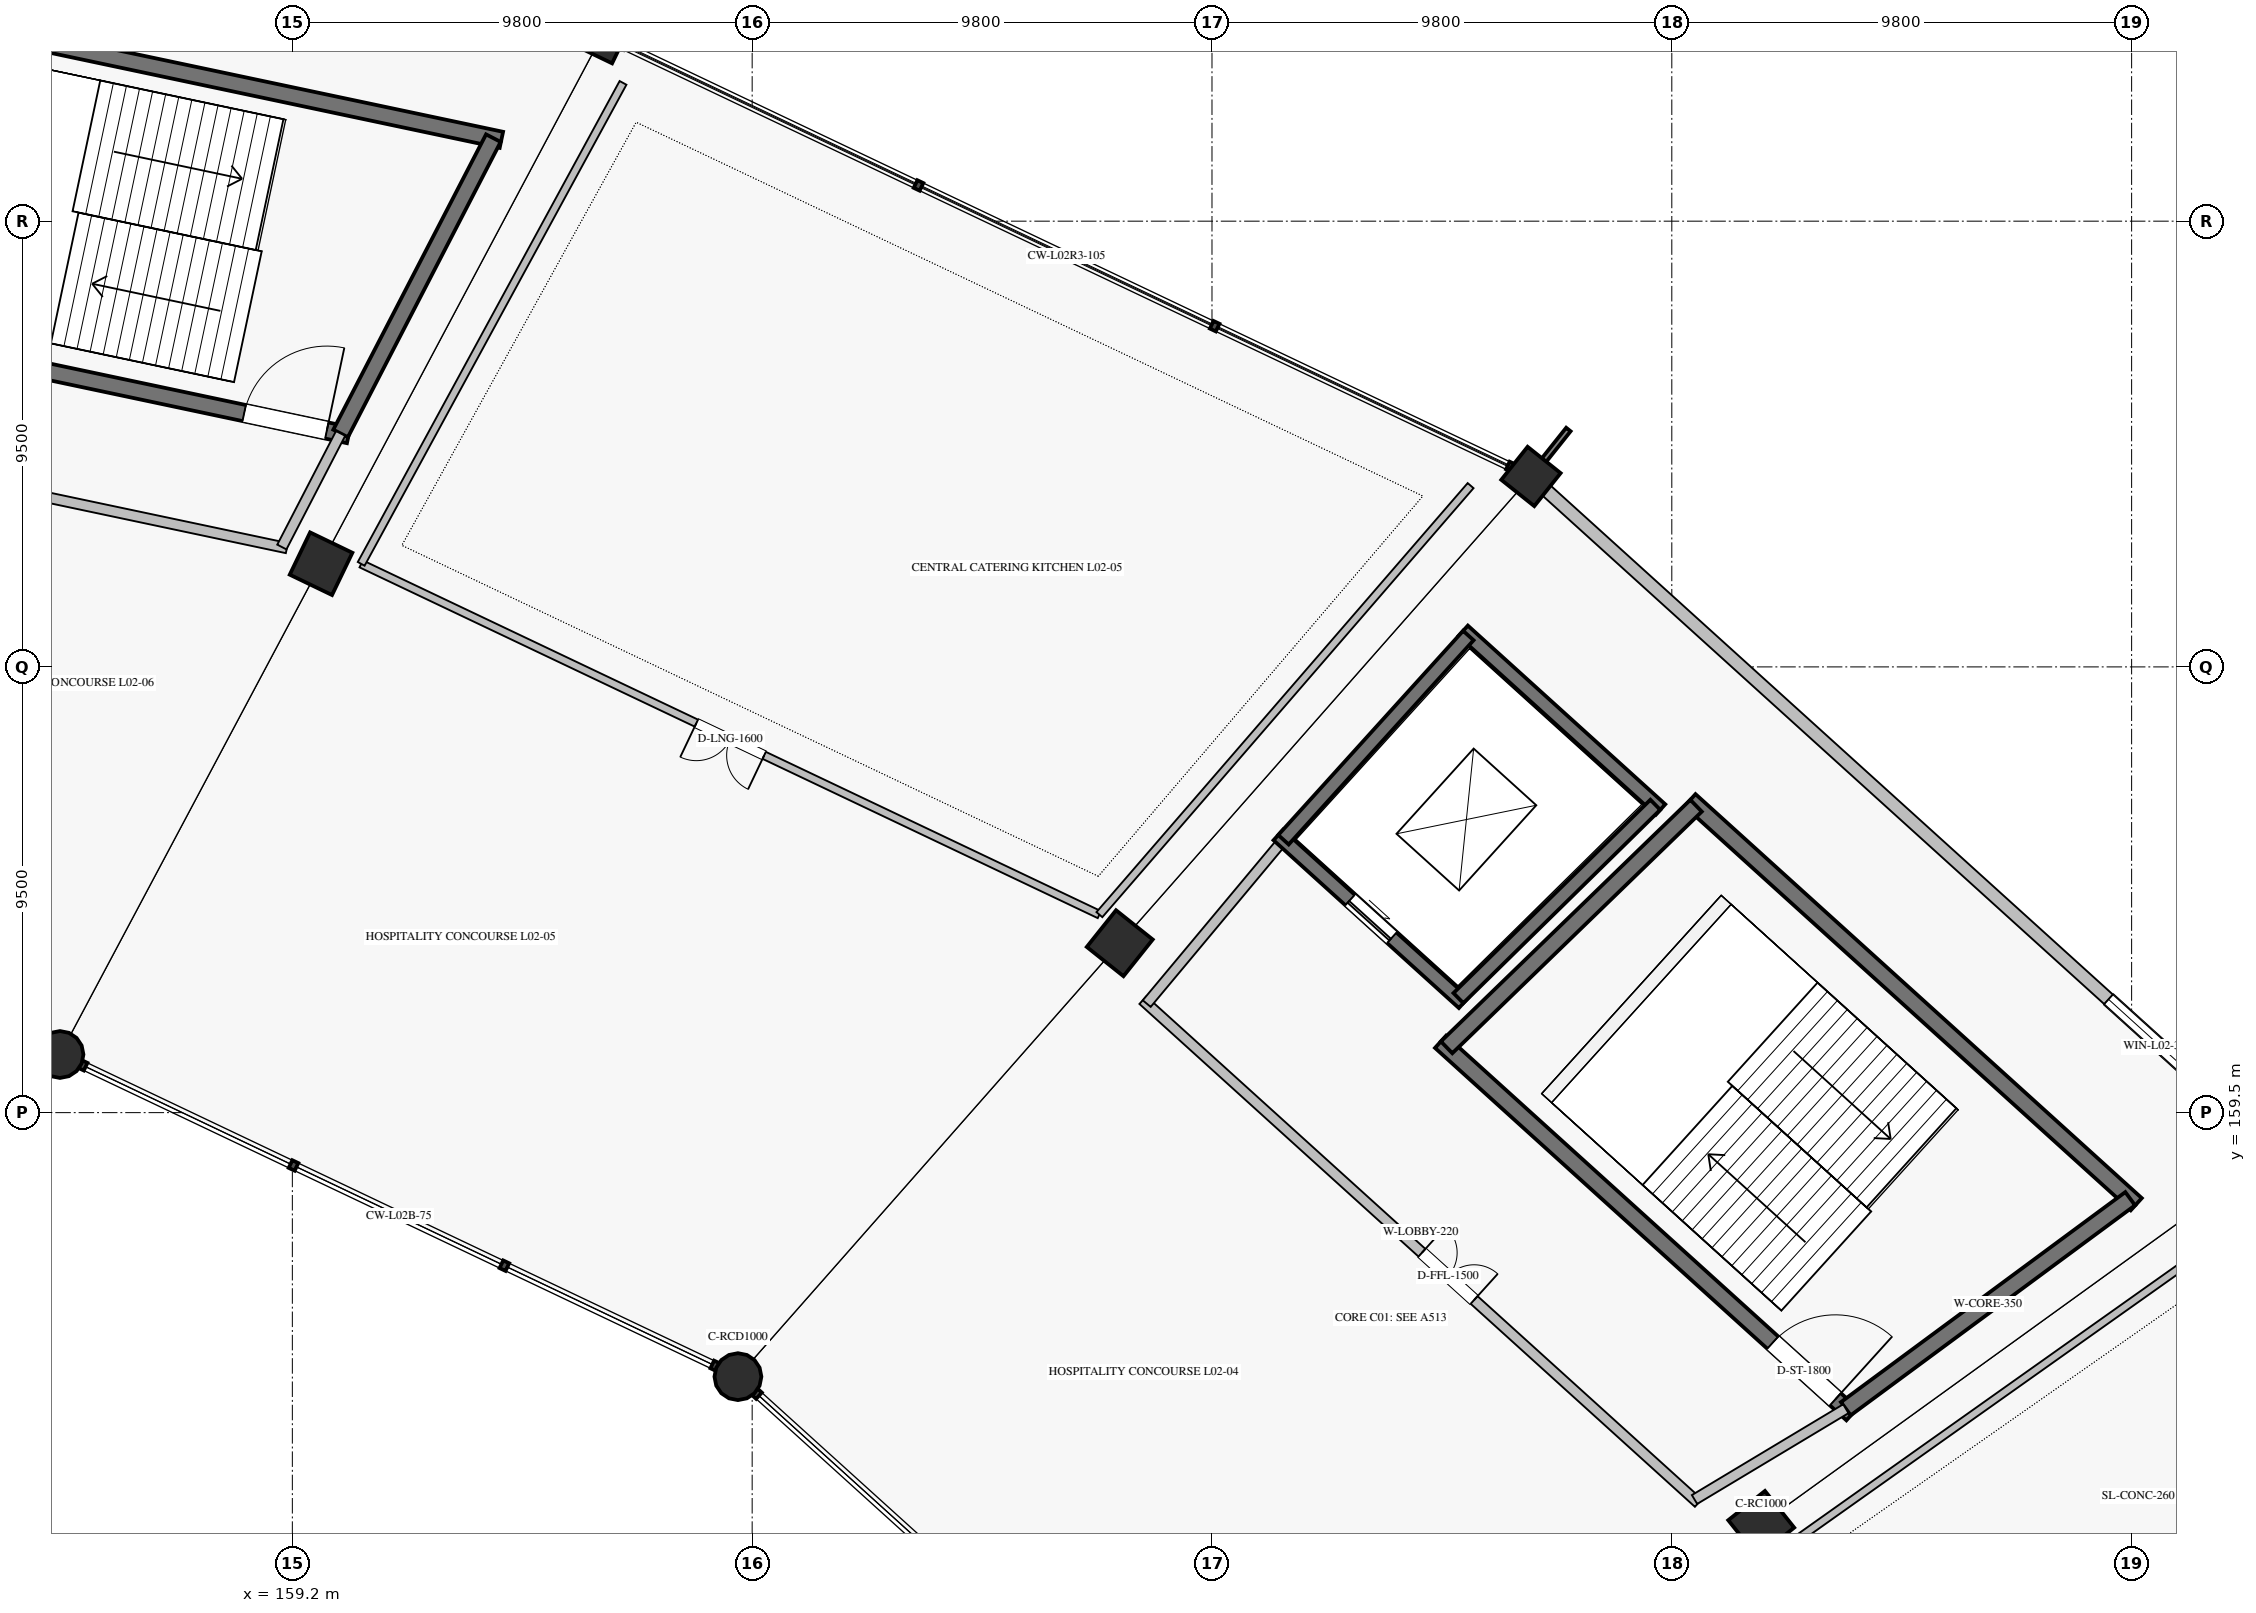
"""IFC4 building model, lengths in metres.
Left out: names, types, materials, properties, quantities, classifications, styles, units other than length and angle.
Written with IfcOpenShell. Run it as: python <this file> out.ifc"""

import sys

from ifc_helpers import new_model, si_unit, direction, frame, frame_2d, origin, origin_2d, place, context, subcontext, project, spatial, rectangle, circle, extrude, element, fill, save


model = new_model("IFC4")
c1 = context("Model", 3, precision=1e-05, world=origin(), true_north=direction((0.0, 1.0)))
c2 = subcontext(c1, "Body", "Model", "MODEL_VIEW")
j1 = project(units=[si_unit("LENGTHUNIT", "METRE"), si_unit("PLANEANGLEUNIT", "RADIAN")], contexts=[c1])
p1 = place(None, origin())
s1 = spatial("IfcSite", under=j1, at=p1, CompositionType="ELEMENT")
p2 = place(p1, origin())
s2 = spatial("IfcBuilding", under=s1, at=p2, CompositionType="ELEMENT")
p3 = place(p2, frame((0.0, 0.0, 10.54)))
s3 = spatial("IfcBuildingStorey", under=s2, at=p3, CompositionType="ELEMENT", Elevation=10.54)
for number, where, z_axis, x_axis in (
    (1, (168.697, 153.873, 0.0), (0.0, 0.0, 1.0), (0.623, 0.782, 0.0)),
    (2, (154.248, 160.739, 0.0), (0.0, 0.0, 1.0), (0.434, 0.901, 0.0)),
):
    element("IfcColumn", number, at=place(p3, frame(where, z_axis=z_axis, x_axis=x_axis)), inside=s3, PredefinedType="COLUMN", context=c2, shape_type="SweptSolid", body=[
        extrude(circle(Radius=0.5, at=origin_2d()), origin(), (0.0, 0.0, 1.0), 5.1),
    ])
for number, where, z_axis, x_axis in (
    (3, (190.506, 150.734, 0.0), (0.0, 0.0, 1.0), (0.782, 0.623, 0.0)),
    (4, (176.834, 163.111, 0.0), (0.0, 0.0, 1.0), (0.623, 0.782, 0.0)),
    (5, (159.812, 171.199, 0.0), (0.0, 0.0, 1.0), (0.434, 0.901, 0.0)),
):
    element("IfcColumn", number, at=place(p3, frame(where, z_axis=z_axis, x_axis=x_axis)), inside=s3, PredefinedType="COLUMN", context=c2, shape_type="SweptSolid", body=[
        extrude(rectangle(XDim=1.0, YDim=1.0, at=origin_2d()), origin(), (0.0, 0.0, 1.0), 5.1),
    ])
for number, where, z_axis, x_axis in (
    (6, (185.598, 173.059, 0.0), (0.0, 0.0, 1.0), (0.623, 0.782, 0.0)),
    (7, (165.805, 182.464, 0.0), (0.0, 0.0, 1.0), (0.434, 0.901, 0.0)),
):
    element("IfcColumn", number, at=place(p3, frame(where, z_axis=z_axis, x_axis=x_axis)), inside=s3, PredefinedType="COLUMN", context=c2, shape_type="SweptSolid", body=[
        extrude(rectangle(XDim=0.9, YDim=0.9, at=origin_2d()), origin(), (0.0, 0.0, 1.0), 5.1),
    ])
p4 = place(p3, frame((201.169, 158.963, 0.0), z_axis=(0.0, 0.0, 1.0), x_axis=(-0.741352367697, 0.671115986183, 0.0)))
e8 = element("IfcWall", 8, at=p4, inside=s3, PredefinedType="SOLIDWALL", context=c2, shape_type="SweptSolid", body=[
    extrude(rectangle(XDim=20.564, YDim=0.275, at=frame_2d((10.282, 0.0))), origin(), (0.0, 0.0, 1.0), 4.138),
])
p5 = place(p4, frame((1.4, 0.0, 1.0)))
e9 = element("IfcOpeningElement", 9, at=p5, cuts=e8, PredefinedType="OPENING", context=c2, shape_type="SweptSolid", body=[
    extrude(rectangle(XDim=3.0, YDim=2.1, at=frame_2d((1.5, 1.05))), frame((0.0, 0.147, 0.0), z_axis=(0.0, -1.0, 0.0), x_axis=(1.0, 0.0, 0.0)), (0.0, 0.0, 1.0), 0.295),
])
p6 = place(p3, frame((192.439, 153.072, 0.0), z_axis=(0.0, 0.0, 1.0), x_axis=(-0.741358227035, 0.671109513572, 0.0)))
e10 = element("IfcWall", 10, at=p6, inside=s3, PredefinedType="SHEAR", context=c2, shape_type="SweptSolid", body=[
    extrude(rectangle(XDim=11.827, YDim=0.35, at=frame_2d((5.913, 0.0))), origin(), (0.0, 0.0, 1.0), 4.84),
])
p7 = place(p6, frame((0.475, 0.0, 0.0)))
e11 = element("IfcOpeningElement", 11, at=p7, cuts=e10, PredefinedType="OPENING", context=c2, shape_type="SweptSolid", body=[
    extrude(rectangle(XDim=1.8, YDim=2.2, at=frame_2d((0.9, 1.1))), frame((0.0, 0.185, 0.0), z_axis=(0.0, -1.0, 0.0), x_axis=(1.0, 0.0, 0.0)), (0.0, 0.0, 1.0), 0.37),
])
p8 = place(p3, frame((198.499, 157.548, 0.0), z_axis=(0.0, 0.0, 1.0), x_axis=(-0.741351373721, 0.671117084183, 0.0)))
e12 = element("IfcWall", 12, at=p8, inside=s3, PredefinedType="SHEAR", context=c2, shape_type="SweptSolid", body=[
    extrude(rectangle(XDim=12.83, YDim=0.35, at=frame_2d((6.415, 0.0))), origin(), (0.0, 0.0, 1.0), 4.84),
])
p9 = place(p3, frame((192.309, 153.189, 0.0), z_axis=(0.0, 0.0, 1.0), x_axis=(0.804395625347, 0.594093997548, 0.0)))
e13 = element("IfcWall", 13, at=p9, inside=s3, PredefinedType="SHEAR", context=c2, shape_type="SweptSolid", body=[
    extrude(rectangle(XDim=7.534, YDim=0.35, at=frame_2d((3.767, 0.0))), origin(), (0.0, 0.0, 1.0), 4.84),
])
p10 = place(p3, frame((183.801, 160.892, 0.0), z_axis=(0.0, 0.0, 1.0), x_axis=(0.718297398554, 0.69573619083, 0.0)))
e14 = element("IfcWall", 14, at=p10, inside=s3, PredefinedType="SHEAR", context=c2, shape_type="SweptSolid", body=[
    extrude(rectangle(XDim=7.402, YDim=0.35, at=frame_2d((3.701, 0.0))), origin(), (0.0, 0.0, 1.0), 4.84),
])
p11 = place(p3, frame((184.163, 161.841, 0.0), z_axis=(0.0, 0.0, 1.0), x_axis=(-0.741350155641, 0.671118429736, 0.0)))
e15 = element("IfcWall", 15, at=p11, inside=s3, PredefinedType="SHEAR", context=c2, shape_type="SweptSolid", body=[
    extrude(rectangle(XDim=5.329, YDim=0.3, at=frame_2d((2.665, 0.0))), origin(), (0.0, 0.0, 1.0), 4.84),
])
p12 = place(p11, frame((2.065, 0.0, 0.0)))
e16 = element("IfcOpeningElement", 16, at=p12, cuts=e15, PredefinedType="OPENING", context=c2, shape_type="SweptSolid", body=[
    extrude(rectangle(XDim=1.2, YDim=2.2, at=frame_2d((0.6, 1.1))), frame((0.0, 0.16, 0.0), z_axis=(0.0, -1.0, 0.0), x_axis=(1.0, 0.0, 0.0)), (0.0, 0.0, 1.0), 0.32),
])
p13 = place(p3, frame((188.36, 165.961, 0.0), z_axis=(0.0, 0.0, 1.0), x_axis=(-0.74134208775, 0.671127341815, 0.0)))
e17 = element("IfcWall", 17, at=p13, inside=s3, PredefinedType="SHEAR", context=c2, shape_type="SweptSolid", body=[
    extrude(rectangle(XDim=5.675, YDim=0.3, at=frame_2d((2.837, 0.0))), origin(), (0.0, 0.0, 1.0), 4.84),
])
p14 = place(p3, frame((184.052, 161.941, 0.0), z_axis=(0.0, 0.0, 1.0), x_axis=(0.713553028001, 0.700601224828, 0.0)))
e18 = element("IfcWall", 18, at=p14, inside=s3, PredefinedType="SHEAR", context=c2, shape_type="SweptSolid", body=[
    extrude(rectangle(XDim=5.881, YDim=0.3, at=frame_2d((2.94, 0.0))), origin(), (0.0, 0.0, 1.0), 4.84),
])
p15 = place(p3, frame((180.324, 165.316, 0.0), z_axis=(0.0, 0.0, 1.0), x_axis=(0.67115829282, 0.741314067031, 0.0)))
e19 = element("IfcWall", 19, at=p15, inside=s3, PredefinedType="SHEAR", context=c2, shape_type="SweptSolid", body=[
    extrude(rectangle(XDim=5.871, YDim=0.3, at=frame_2d((2.935, 0.0))), origin(), (0.0, 0.0, 1.0), 4.84),
])
p16 = place(p3, frame((189.166, 151.181, 0.0), z_axis=(0.0, 0.0, 1.0), x_axis=(-0.741351035574, 0.671117457717, 0.0)))
e20 = element("IfcWall", 20, at=p16, inside=s3, PredefinedType="SOLIDWALL", context=c2, shape_type="SweptSolid", body=[
    extrude(rectangle(XDim=15.969, YDim=0.22, at=frame_2d((7.985, 0.0))), origin(), (0.0, 0.0, 1.0), 4.84),
])
p17 = place(p16, frame((6.447, 0.0, 0.0)))
e21 = element("IfcOpeningElement", 21, at=p17, cuts=e20, PredefinedType="OPENING", context=c2, shape_type="SweptSolid", body=[
    extrude(rectangle(XDim=1.5, YDim=2.2, at=frame_2d((0.75, 1.1))), frame((0.0, 0.12, 0.0), z_axis=(0.0, -1.0, 0.0), x_axis=(1.0, 0.0, 0.0)), (0.0, 0.0, 1.0), 0.24),
])
p18 = place(p3, frame((189.085, 151.254, 0.0), z_axis=(0.0, 0.0, 1.0), x_axis=(0.857424171966, 0.514610327654, 0.0)))
e22 = element("IfcWall", 22, at=p18, inside=s3, PredefinedType="SOLIDWALL", context=c2, shape_type="SweptSolid", body=[
    extrude(rectangle(XDim=3.76, YDim=0.22, at=frame_2d((1.88, 0.0))), origin(), (0.0, 0.0, 1.0), 4.84),
])
p19 = place(p3, frame((177.409, 161.824, 0.0), z_axis=(0.0, 0.0, 1.0), x_axis=(0.640759627034, 0.767741558315, 0.0)))
e23 = element("IfcWall", 23, at=p19, inside=s3, PredefinedType="SOLIDWALL", context=c2, shape_type="SweptSolid", body=[
    extrude(rectangle(XDim=4.549, YDim=0.22, at=frame_2d((2.274, 0.0))), origin(), (0.0, 0.0, 1.0), 4.84),
])
p20 = place(p3, frame((160.4, 173.94, 0.0), z_axis=(0.0, 0.0, 1.0), x_axis=(-0.978345203961, 0.206979858648, 0.0)))
e24 = element("IfcWall", 24, at=p20, inside=s3, PredefinedType="SHEAR", context=c2, shape_type="SweptSolid", body=[
    extrude(rectangle(XDim=12.044, YDim=0.35, at=frame_2d((6.022, 0.0))), origin(), (0.0, 0.0, 1.0), 4.84),
])
p21 = place(p20, frame((0.475, 0.0, 0.0)))
e25 = element("IfcOpeningElement", 25, at=p21, cuts=e24, PredefinedType="OPENING", context=c2, shape_type="SweptSolid", body=[
    extrude(rectangle(XDim=1.8, YDim=2.2, at=frame_2d((0.9, 1.1))), frame((0.0, 0.185, 0.0), z_axis=(0.0, -1.0, 0.0), x_axis=(1.0, 0.0, 0.0)), (0.0, 0.0, 1.0), 0.37),
])
p22 = place(p3, frame((163.655, 180.233, 0.0), z_axis=(0.0, 0.0, 1.0), x_axis=(-0.978345119536, 0.206980257705, 0.0)))
e26 = element("IfcWall", 26, at=p22, inside=s3, PredefinedType="SHEAR", context=c2, shape_type="SweptSolid", body=[
    extrude(rectangle(XDim=13.067, YDim=0.35, at=frame_2d((6.533, 0.0))), origin(), (0.0, 0.0, 1.0), 4.84),
])
p23 = place(p3, frame((160.229, 173.976, 0.0), z_axis=(0.0, 0.0, 1.0), x_axis=(0.459409796564, 0.888224430435, 0.0)))
e27 = element("IfcWall", 27, at=p23, inside=s3, PredefinedType="SHEAR", context=c2, shape_type="SweptSolid", body=[
    extrude(rectangle(XDim=7.086, YDim=0.35, at=frame_2d((3.543, 0.0))), origin(), (0.0, 0.0, 1.0), 4.84),
])
p24 = place(p3, frame((159.084, 171.532, 0.0), z_axis=(0.0, 0.0, 1.0), x_axis=(-0.978342313718, 0.206993519678, 0.0)))
e28 = element("IfcWall", 28, at=p24, inside=s3, PredefinedType="SOLIDWALL", context=c2, shape_type="SweptSolid", body=[
    extrude(rectangle(XDim=16.983, YDim=0.22, at=frame_2d((8.492, 0.0))), origin(), (0.0, 0.0, 1.0), 3.788),
])
p25 = place(p24, frame((6.903, 0.0, 0.0)))
e29 = element("IfcOpeningElement", 29, at=p25, cuts=e28, PredefinedType="OPENING", context=c2, shape_type="SweptSolid", body=[
    extrude(rectangle(XDim=1.5, YDim=2.2, at=frame_2d((0.75, 1.1))), frame((0.0, 0.12, 0.0), z_axis=(0.0, -1.0, 0.0), x_axis=(1.0, 0.0, 0.0)), (0.0, 0.0, 1.0), 0.24),
])
p26 = place(p3, frame((158.976, 171.555, 0.0), z_axis=(0.0, 0.0, 1.0), x_axis=(0.459461910618, 0.888197473928, 0.0)))
e30 = element("IfcWall", 30, at=p26, inside=s3, PredefinedType="SOLIDWALL", context=c2, shape_type="SweptSolid", body=[
    extrude(rectangle(XDim=2.725, YDim=0.22, at=frame_2d((1.363, 0.0))), origin(), (0.0, 0.0, 1.0), 4.84),
])
p27 = place(p3, frame((191.179, 150.342, 0.0), z_axis=(0.0, 0.0, 1.0), x_axis=(0.815753527099, 0.578399674122, 0.0)))
e31 = element("IfcWall", 31, at=p27, inside=s3, PredefinedType="PARTITIONING", context=c2, shape_type="SweptSolid", body=[
    extrude(rectangle(XDim=12.382, YDim=0.165, at=frame_2d((6.191, 0.0))), origin(), (0.0, 0.0, 1.0), 4.16),
])
p28 = place(p3, frame((176.401, 163.72, 0.0), z_axis=(0.0, 0.0, 1.0), x_axis=(-0.903217202186, 0.429183743488, 0.0)))
e32 = element("IfcWall", 32, at=p28, inside=s3, PredefinedType="PARTITIONING", context=c2, shape_type="SweptSolid", body=[
    extrude(rectangle(XDim=17.419, YDim=0.165, at=frame_2d((8.709, 0.0))), origin(), (0.0, 0.0, 1.0), 4.16),
])
p29 = place(p28, frame((7.91, 0.0, 0.0)))
e33 = element("IfcOpeningElement", 33, at=p29, cuts=e32, PredefinedType="OPENING", context=c2, shape_type="SweptSolid", body=[
    extrude(rectangle(XDim=1.6, YDim=2.3, at=frame_2d((0.8, 1.15))), frame((0.0, 0.093, 0.0), z_axis=(0.0, -1.0, 0.0), x_axis=(1.0, 0.0, 0.0)), (0.0, 0.0, 1.0), 0.185),
])
p30 = place(p3, frame((176.401, 163.72, 0.0), z_axis=(0.0, 0.0, 1.0), x_axis=(0.654293035882, 0.756241114458, 0.0)))
e34 = element("IfcWall", 34, at=p30, inside=s3, PredefinedType="PARTITIONING", context=c2, shape_type="SweptSolid", body=[
    extrude(rectangle(XDim=12.091, YDim=0.165, at=frame_2d((6.045, 0.0))), origin(), (0.0, 0.0, 1.0), 4.16),
])
p31 = place(p3, frame((160.667, 171.196, 0.0), z_axis=(0.0, 0.0, 1.0), x_axis=(0.478125060974, 0.878291765912, 0.0)))
e35 = element("IfcWall", 35, at=p31, inside=s3, PredefinedType="PARTITIONING", context=c2, shape_type="SweptSolid", body=[
    extrude(rectangle(XDim=11.672, YDim=0.165, at=frame_2d((5.836, 0.0))), origin(), (0.0, 0.0, 1.0), 4.16),
])
p32 = place(p5, origin())
e36 = element("IfcWindow", 36, at=p32, inside=s3, PartitioningType="SINGLE_PANEL", PredefinedType="WINDOW", context=c2, shape_type="SweptSolid", body=[
    extrude(rectangle(XDim=3.0, YDim=2.1, at=frame_2d((1.5, 1.05))), frame((0.0, 0.03, 0.0), z_axis=(0.0, -1.0, 0.0), x_axis=(1.0, 0.0, 0.0)), (0.0, 0.0, 1.0), 0.06),
])
fill(e9, e36)
p33 = place(p7, frame((1.8, 0.0, 0.0), z_axis=(0.0, 0.0, 1.0), x_axis=(-1.0, 0.0, 0.0)))
e37 = element("IfcDoor", 37, at=p33, inside=s3, OperationType="SINGLE_SWING_RIGHT", PredefinedType="DOOR", context=c2, shape_type="SweptSolid", body=[
    extrude(rectangle(XDim=1.8, YDim=2.2, at=frame_2d((0.9, 1.1))), frame((0.0, 0.025, 0.0), z_axis=(0.0, -1.0, 0.0), x_axis=(1.0, 0.0, 0.0)), (0.0, 0.0, 1.0), 0.05),
])
fill(e11, e37)
p34 = place(p12, origin())
e38 = element("IfcDoor", 38, at=p34, inside=s3, OperationType="SLIDING_TO_LEFT", PredefinedType="DOOR", context=c2, shape_type="SweptSolid", body=[
    extrude(rectangle(XDim=1.2, YDim=2.2, at=frame_2d((0.6, 1.1))), frame((0.0, 0.025, 0.0), z_axis=(0.0, -1.0, 0.0), x_axis=(1.0, 0.0, 0.0)), (0.0, 0.0, 1.0), 0.05),
])
fill(e16, e38)
p35 = place(p17, frame((1.5, 0.0, 0.0), z_axis=(0.0, 0.0, 1.0), x_axis=(-1.0, 0.0, 0.0)))
e39 = element("IfcDoor", 39, at=p35, inside=s3, OperationType="DOUBLE_DOOR_SINGLE_SWING", PredefinedType="DOOR", context=c2, shape_type="SweptSolid", body=[
    extrude(rectangle(XDim=1.5, YDim=2.2, at=frame_2d((0.75, 1.1))), frame((0.0, 0.025, 0.0), z_axis=(0.0, -1.0, 0.0), x_axis=(1.0, 0.0, 0.0)), (0.0, 0.0, 1.0), 0.05),
])
fill(e21, e39)
p36 = place(p21, frame((1.8, 0.0, 0.0), z_axis=(0.0, 0.0, 1.0), x_axis=(-1.0, 0.0, 0.0)))
e40 = element("IfcDoor", 40, at=p36, inside=s3, OperationType="SINGLE_SWING_RIGHT", PredefinedType="DOOR", context=c2, shape_type="SweptSolid", body=[
    extrude(rectangle(XDim=1.8, YDim=2.2, at=frame_2d((0.9, 1.1))), frame((0.0, 0.025, 0.0), z_axis=(0.0, -1.0, 0.0), x_axis=(1.0, 0.0, 0.0)), (0.0, 0.0, 1.0), 0.05),
])
fill(e25, e40)
p37 = place(p29, origin())
e41 = element("IfcDoor", 41, at=p37, inside=s3, OperationType="DOUBLE_DOOR_SINGLE_SWING", PredefinedType="DOOR", context=c2, shape_type="SweptSolid", body=[
    extrude(rectangle(XDim=1.6, YDim=2.3, at=frame_2d((0.8, 1.15))), frame((0.0, 0.025, 0.0), z_axis=(0.0, -1.0, 0.0), x_axis=(1.0, 0.0, 0.0)), (0.0, 0.0, 1.0), 0.05),
])
fill(e33, e41)
save(model, sys.argv[1])
